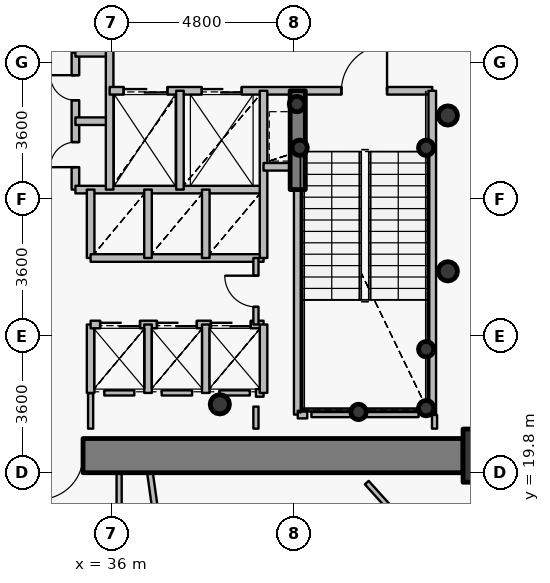
"""IFC4 building model, lengths in metres.
Left out: names, types, materials, properties, quantities, classifications, styles, units other than length and angle.
Written with IfcOpenShell. Run it as: python <this file> out.ifc"""

import sys

from ifc_helpers import new_model, si_unit, direction, frame, frame_2d, origin, origin_2d, place, context, subcontext, project, spatial, rectangle, hollow_circle, extrude, source, transform, mapped, element, fill, save


model = new_model("IFC4")
c1 = context("Model", 3, precision=1e-05, world=origin(), true_north=direction((0.0, 1.0)))
c2 = subcontext(c1, "Body", "Model", "MODEL_VIEW")
j1 = project(units=[si_unit("LENGTHUNIT", "METRE"), si_unit("PLANEANGLEUNIT", "RADIAN")], contexts=[c1])
p1 = place(None, origin())
s1 = spatial("IfcSite", under=j1, at=p1, CompositionType="ELEMENT")
p2 = place(p1, origin())
s2 = spatial("IfcBuilding", under=s1, at=p2, CompositionType="ELEMENT")
p3 = place(p2, frame((0.0, 0.0, 40.8)))
s3 = spatial("IfcBuildingStorey", under=s2, at=p3, CompositionType="ELEMENT", Elevation=40.8)
p4 = place(p3, frame((45.95, 20.25, 0.0), z_axis=(0.0, 0.0, 1.0), x_axis=(1.0, 0.0, 0.0)))
e1 = element("IfcColumn", 1, at=p4, inside=s3, PredefinedType="COLUMN", context=c2, shape_type="SweptSolid", body=[
    extrude(rectangle(XDim=1.4, YDim=1.4, at=origin_2d()), origin(), (0.0, 0.0, 1.0), 4.2),
])
p5 = place(p3, frame((38.85, 21.6, 0.0), z_axis=(0.0, 0.0, 1.0), x_axis=(1.0, 0.0, 0.0)))
e2 = element("IfcColumn", 2, at=p5, inside=s3, PredefinedType="COLUMN", context=c2, shape_type="SweptSolid", body=[
    extrude(hollow_circle(Radius=0.254, WallThickness=0.02, at=origin_2d()), origin(), (0.0, 0.0, 1.0), 4.2),
])
for number, where, z_axis, x_axis in (
    (3, (44.28, 21.5, 0.0), (0.0, 0.0, 1.0), (1.0, 0.0, 0.0)),
    (4, (44.28, 23.05, 0.0), (0.0, 0.0, 1.0), (1.0, 0.0, 0.0)),
    (5, (42.5, 21.4, 0.0), (0.0, 0.0, 1.0), (1.0, 0.0, 0.0)),
    (6, (40.95, 28.35, 0.0), (0.0, 0.0, 1.0), (1.0, 0.0, 0.0)),
    (7, (44.28, 28.35, 0.0), (0.0, 0.0, 1.0), (1.0, 0.0, 0.0)),
    (8, (40.88, 29.5, 0.0), (0.0, 0.0, 1.0), (1.0, 0.0, 0.0)),
):
    element("IfcColumn", number, at=place(p3, frame(where, z_axis=z_axis, x_axis=x_axis)), inside=s3, PredefinedType="COLUMN", context=c2, shape_type="SweptSolid", body=[
        extrude(hollow_circle(Radius=0.203, WallThickness=0.016, at=origin_2d()), origin(), (0.0, 0.0, 1.0), 4.2),
    ])
p6 = place(p3, frame((45.25, 20.25, 0.0), z_axis=(0.0, 0.0, 1.0), x_axis=(-1.0, 0.0, 0.0)))
e9 = element("IfcWall", 9, at=p6, inside=s3, PredefinedType="SHEAR", context=c2, shape_type="SweptSolid", body=[
    extrude(rectangle(XDim=18.5, YDim=0.9, at=frame_2d((9.25, 0.0))), origin(), (0.0, 0.0, 1.0), 3.4),
])
p7 = place(p6, frame((10.0, 0.0, 0.0)))
e10 = element("IfcOpeningElement", 10, at=p7, cuts=e9, PredefinedType="OPENING", context=c2, shape_type="SweptSolid", body=[
    extrude(rectangle(XDim=1.15, YDim=2.15, at=origin_2d()), frame((0.575, 0.46, 1.075), z_axis=(0.0, -1.0, 0.0), x_axis=(1.0, 0.0, 0.0)), (0.0, 0.0, 1.0), 0.92),
])
p8 = place(p3, frame((40.9, 27.25, 0.0), z_axis=(0.0, 0.0, 1.0), x_axis=(0.0, 1.0, 0.0)))
e11 = element("IfcWall", 11, at=p8, inside=s3, PredefinedType="SHEAR", context=c2, shape_type="SweptSolid", body=[
    extrude(rectangle(XDim=2.6, YDim=0.4, at=frame_2d((1.3, 0.0))), origin(), (0.0, 0.0, 1.0), 3.55),
])
for number, where, z_axis, x_axis in (
    (12, (44.85, 25.1, 0.0), (0.0, 0.0, 1.0), (1.0, 0.0, 0.0)),
    (13, (44.85, 29.2, 0.0), (0.0, 0.0, 1.0), (1.0, 0.0, 0.0)),
):
    element("IfcColumn", number, at=place(p3, frame(where, z_axis=z_axis, x_axis=x_axis)), inside=s3, PredefinedType="COLUMN", context=c2, shape_type="SweptSolid", body=[
        extrude(hollow_circle(Radius=0.254, WallThickness=0.02, at=origin_2d()), origin(), (0.0, 0.0, 1.0), 4.2),
    ])
p9 = place(p3, frame((35.05, 27.25, 0.0), z_axis=(0.0, 0.0, 1.0), x_axis=(0.0, 1.0, 0.0)))
e14 = element("IfcWall", 14, at=p9, inside=s3, PredefinedType="PARTITIONING", context=c2, shape_type="SweptSolid", body=[
    extrude(rectangle(XDim=3.6, YDim=0.2, at=frame_2d((1.8, 0.0))), origin(), (0.0, 0.0, 1.0), 3.95),
])
p10 = place(p9, frame((0.59, 0.0, 0.0)))
e15 = element("IfcOpeningElement", 15, at=p10, cuts=e14, PredefinedType="OPENING", context=c2, shape_type="SweptSolid", body=[
    extrude(rectangle(XDim=0.66, YDim=2.05, at=origin_2d()), frame((0.33, 0.11, 1.025), z_axis=(0.0, -1.0, 0.0), x_axis=(1.0, 0.0, 0.0)), (0.0, 0.0, 1.0), 0.22),
])
p11 = place(p9, frame((2.35, 0.0, 0.0)))
e16 = element("IfcOpeningElement", 16, at=p11, cuts=e14, PredefinedType="OPENING", context=c2, shape_type="SweptSolid", body=[
    extrude(rectangle(XDim=0.66, YDim=2.05, at=origin_2d()), frame((0.33, 0.11, 1.025), z_axis=(0.0, -1.0, 0.0), x_axis=(1.0, 0.0, 0.0)), (0.0, 0.0, 1.0), 0.22),
])
p12 = place(p3, frame((35.05, 27.25, 0.0), z_axis=(0.0, 0.0, 1.0), x_axis=(1.0, 0.0, 0.0)))
e17 = element("IfcWall", 17, at=p12, inside=s3, PredefinedType="PARTITIONING", context=c2, shape_type="SweptSolid", body=[
    extrude(rectangle(XDim=4.95, YDim=0.2, at=frame_2d((2.475, 0.0))), origin(), (0.0, 0.0, 1.0), 3.535),
])
for number, where, z_axis, x_axis in (
    (18, (35.05, 29.05, 0.0), (0.0, 0.0, 1.0), (1.0, 0.0, 0.0)),
    (19, (35.05, 30.85, 0.0), (0.0, 0.0, 1.0), (1.0, 0.0, 0.0)),
):
    element("IfcWall", number, at=place(p3, frame(where, z_axis=z_axis, x_axis=x_axis)), inside=s3, PredefinedType="PARTITIONING", context=c2, shape_type="SweptSolid", body=[
        extrude(rectangle(XDim=0.9, YDim=0.2, at=frame_2d((0.45, 0.0))), origin(), (0.0, 0.0, 1.0), 3.95),
    ])
p13 = place(p3, frame((35.45, 21.9, 0.0), z_axis=(0.0, 0.0, 1.0), x_axis=(0.0, 1.0, 0.0)))
e20 = element("IfcWall", 20, at=p13, inside=s3, PredefinedType="PARTITIONING", context=c2, shape_type="SweptSolid", body=[
    extrude(rectangle(XDim=1.8, YDim=0.2, at=frame_2d((0.9, 0.0))), origin(), (0.0, 0.0, 1.0), 3.95),
])
p14 = place(p3, frame((35.45, 23.7, 0.0), z_axis=(0.0, 0.0, 1.0), x_axis=(1.0, 0.0, 0.0)))
e21 = element("IfcWall", 21, at=p14, inside=s3, PredefinedType="PARTITIONING", context=c2, shape_type="SweptSolid", body=[
    extrude(rectangle(XDim=4.55, YDim=0.2, at=frame_2d((2.275, 0.0))), origin(), (0.0, 0.0, 1.0), 3.535),
])
p15 = place(p14, frame((0.25, 0.0, 0.0)))
e22 = element("IfcOpeningElement", 22, at=p15, cuts=e21, PredefinedType="OPENING", context=c2, shape_type="SweptSolid", body=[
    extrude(rectangle(XDim=1.05, YDim=2.15, at=origin_2d()), frame((0.525, 0.11, 1.075), z_axis=(0.0, -1.0, 0.0), x_axis=(1.0, 0.0, 0.0)), (0.0, 0.0, 1.0), 0.22),
])
p16 = place(p14, frame((1.745, 0.0, 0.0)))
e23 = element("IfcOpeningElement", 23, at=p16, cuts=e21, PredefinedType="OPENING", context=c2, shape_type="SweptSolid", body=[
    extrude(rectangle(XDim=1.05, YDim=2.15, at=origin_2d()), frame((0.525, 0.11, 1.075), z_axis=(0.0, -1.0, 0.0), x_axis=(1.0, 0.0, 0.0)), (0.0, 0.0, 1.0), 0.22),
])
p17 = place(p14, frame((3.165, 0.0, 0.0)))
e24 = element("IfcOpeningElement", 24, at=p17, cuts=e21, PredefinedType="OPENING", context=c2, shape_type="SweptSolid", body=[
    extrude(rectangle(XDim=1.05, YDim=2.15, at=origin_2d()), frame((0.525, 0.11, 1.075), z_axis=(0.0, -1.0, 0.0), x_axis=(1.0, 0.0, 0.0)), (0.0, 0.0, 1.0), 0.22),
])
p18 = place(p3, frame((35.45, 25.45, 0.0), z_axis=(0.0, 0.0, 1.0), x_axis=(0.0, 1.0, 0.0)))
e25 = element("IfcWall", 25, at=p18, inside=s3, PredefinedType="PARTITIONING", context=c2, shape_type="SweptSolid", body=[
    extrude(rectangle(XDim=1.8, YDim=0.2, at=frame_2d((0.9, 0.0))), origin(), (0.0, 0.0, 1.0), 3.95),
])
p19 = place(p3, frame((35.45, 25.45, 0.0), z_axis=(0.0, 0.0, 1.0), x_axis=(1.0, 0.0, 0.0)))
e26 = element("IfcWall", 26, at=p19, inside=s3, PredefinedType="PARTITIONING", context=c2, shape_type="SweptSolid", body=[
    extrude(rectangle(XDim=4.55, YDim=0.2, at=frame_2d((2.275, 0.0))), origin(), (0.0, 0.0, 1.0), 3.535),
])
p20 = place(p3, frame((35.95, 27.25, 0.0), z_axis=(0.0, 0.0, 1.0), x_axis=(0.0, 1.0, 0.0)))
e27 = element("IfcWall", 27, at=p20, inside=s3, PredefinedType="PARTITIONING", context=c2, shape_type="SweptSolid", body=[
    extrude(rectangle(XDim=3.8, YDim=0.2, at=frame_2d((1.9, 0.0))), origin(), (0.0, 0.0, 1.0), 3.95),
])
p21 = place(p3, frame((35.95, 29.85, 0.0), z_axis=(0.0, 0.0, 1.0), x_axis=(1.0, 0.0, 0.0)))
e28 = element("IfcWall", 28, at=p21, inside=s3, PredefinedType="PARTITIONING", context=c2, shape_type="SweptSolid", body=[
    extrude(rectangle(XDim=8.49, YDim=0.2, at=frame_2d((4.245, 0.0))), origin(), (0.0, 0.0, 1.0), 3.535),
])
p22 = place(p21, frame((6.1, 0.0, 0.0)))
e29 = element("IfcOpeningElement", 29, at=p22, cuts=e28, PredefinedType="OPENING", context=c2, shape_type="SweptSolid", body=[
    extrude(rectangle(XDim=1.2, YDim=2.15, at=origin_2d()), frame((0.6, 0.11, 1.075), z_axis=(0.0, -1.0, 0.0), x_axis=(1.0, 0.0, 0.0)), (0.0, 0.0, 1.0), 0.22),
])
p23 = place(p21, frame((0.37, 0.0, 0.0)))
e30 = element("IfcOpeningElement", 30, at=p23, cuts=e28, PredefinedType="OPENING", context=c2, shape_type="SweptSolid", body=[
    extrude(rectangle(XDim=1.15, YDim=2.15, at=origin_2d()), frame((0.575, 0.11, 1.075), z_axis=(0.0, -1.0, 0.0), x_axis=(1.0, 0.0, 0.0)), (0.0, 0.0, 1.0), 0.22),
])
p24 = place(p21, frame((2.425, 0.0, 0.0)))
e31 = element("IfcOpeningElement", 31, at=p24, cuts=e28, PredefinedType="OPENING", context=c2, shape_type="SweptSolid", body=[
    extrude(rectangle(XDim=1.05, YDim=2.15, at=origin_2d()), frame((0.525, 0.11, 1.075), z_axis=(0.0, -1.0, 0.0), x_axis=(1.0, 0.0, 0.0)), (0.0, 0.0, 1.0), 0.22),
])
p25 = place(p3, frame((36.2, 17.9, 0.0), z_axis=(0.0, 0.0, 1.0), x_axis=(0.0, 1.0, 0.0)))
e32 = element("IfcWall", 32, at=p25, inside=s3, PredefinedType="PARTITIONING", context=c2, shape_type="SweptSolid", body=[
    extrude(rectangle(XDim=1.9, YDim=0.135, at=frame_2d((0.95, 0.0))), origin(), (0.0, 0.0, 1.0), 3.285),
])
for number, where, z_axis, x_axis in (
    (33, (36.96, 21.9, 0.0), (0.0, 0.0, 1.0), (0.0, 1.0, 0.0)),
    (34, (36.96, 25.45, 0.0), (0.0, 0.0, 1.0), (0.0, 1.0, 0.0)),
):
    element("IfcWall", number, at=place(p3, frame(where, z_axis=z_axis, x_axis=x_axis)), inside=s3, PredefinedType="PARTITIONING", context=c2, shape_type="SweptSolid", body=[
        extrude(rectangle(XDim=1.8, YDim=0.2, at=frame_2d((0.9, 0.0))), origin(), (0.0, 0.0, 1.0), 3.95),
    ])
p26 = place(p3, frame((37.012, 19.8, 0.0), z_axis=(0.0, 0.0, 1.0), x_axis=(0.139168038406, -0.990268780224, 0.0)))
e35 = element("IfcWall", 35, at=p26, inside=s3, PredefinedType="PARTITIONING", context=c2, shape_type="SweptSolid", body=[
    extrude(rectangle(XDim=17.067, YDim=0.15, at=frame_2d((8.534, 0.0))), origin(), (0.0, 0.0, 1.0), 3.335),
])
p27 = place(p3, frame((37.8, 27.25, 0.0), z_axis=(0.0, 0.0, 1.0), x_axis=(0.0, 1.0, 0.0)))
e36 = element("IfcWall", 36, at=p27, inside=s3, PredefinedType="PARTITIONING", context=c2, shape_type="SweptSolid", body=[
    extrude(rectangle(XDim=2.6, YDim=0.2, at=frame_2d((1.3, 0.0))), origin(), (0.0, 0.0, 1.0), 3.95),
])
for number, where, z_axis, x_axis in (
    (37, (38.48, 21.9, 0.0), (0.0, 0.0, 1.0), (0.0, 1.0, 0.0)),
    (38, (38.48, 25.45, 0.0), (0.0, 0.0, 1.0), (0.0, 1.0, 0.0)),
):
    element("IfcWall", number, at=place(p3, frame(where, z_axis=z_axis, x_axis=x_axis)), inside=s3, PredefinedType="PARTITIONING", context=c2, shape_type="SweptSolid", body=[
        extrude(rectangle(XDim=1.8, YDim=0.2, at=frame_2d((0.9, 0.0))), origin(), (0.0, 0.0, 1.0), 3.95),
    ])
p28 = place(p3, frame((39.8, 21.9, 0.0), z_axis=(0.0, 0.0, 1.0), x_axis=(1.0, 0.0, 0.0)))
e39 = element("IfcWall", 39, at=p28, inside=s3, PredefinedType="PARTITIONING", context=c2, shape_type="SweptSolid", body=[
    extrude(rectangle(XDim=0.2, YDim=0.2, at=frame_2d((0.1, 0.0))), origin(), (0.0, 0.0, 1.0), 3.95),
])
p29 = place(p3, frame((39.8, 23.7, 0.0), z_axis=(0.0, 0.0, 1.0), x_axis=(0.0, 1.0, 0.0)))
e40 = element("IfcWall", 40, at=p29, inside=s3, PredefinedType="PARTITIONING", context=c2, shape_type="SweptSolid", body=[
    extrude(rectangle(XDim=1.75, YDim=0.135, at=frame_2d((0.875, 0.0))), origin(), (0.0, 0.0, 1.0), 3.95),
])
p30 = place(p29, frame((0.465, 0.0, 0.0)))
e41 = element("IfcOpeningElement", 41, at=p30, cuts=e40, PredefinedType="OPENING", context=c2, shape_type="SweptSolid", body=[
    extrude(rectangle(XDim=0.82, YDim=2.1, at=origin_2d()), frame((0.41, 0.078, 1.05), z_axis=(0.0, -1.0, 0.0), x_axis=(1.0, 0.0, 0.0)), (0.0, 0.0, 1.0), 0.155),
])
p31 = place(p3, frame((40.0, 21.9, 0.0), z_axis=(0.0, 0.0, 1.0), x_axis=(0.0, 1.0, 0.0)))
e42 = element("IfcWall", 42, at=p31, inside=s3, PredefinedType="PARTITIONING", context=c2, shape_type="SweptSolid", body=[
    extrude(rectangle(XDim=1.8, YDim=0.2, at=frame_2d((0.9, 0.0))), origin(), (0.0, 0.0, 1.0), 3.95),
])
p32 = place(p3, frame((40.0, 25.45, 0.0), z_axis=(0.0, 0.0, 1.0), x_axis=(0.0, 1.0, 0.0)))
e43 = element("IfcWall", 43, at=p32, inside=s3, PredefinedType="PARTITIONING", context=c2, shape_type="SweptSolid", body=[
    extrude(rectangle(XDim=4.4, YDim=0.2, at=frame_2d((2.2, 0.0))), origin(), (0.0, 0.0, 1.0), 3.95),
])
p33 = place(p3, frame((40.0, 27.85, 0.0), z_axis=(0.0, 0.0, 1.0), x_axis=(1.0, 0.0, 0.0)))
e44 = element("IfcWall", 44, at=p33, inside=s3, PredefinedType="PARTITIONING", context=c2, shape_type="SweptSolid", body=[
    extrude(rectangle(XDim=0.9, YDim=0.2, at=frame_2d((0.45, 0.0))), origin(), (0.0, 0.0, 1.0), 3.95),
])
p34 = place(p3, frame((40.9, 21.33, 0.0), z_axis=(0.0, 0.0, 1.0), x_axis=(0.0, 1.0, 0.0)))
e45 = element("IfcWall", 45, at=p34, inside=s3, PredefinedType="PARTITIONING", context=c2, shape_type="SweptSolid", body=[
    extrude(rectangle(XDim=5.91, YDim=0.2, at=frame_2d((2.955, 0.0))), origin(), (0.0, 0.0, 1.0), 3.485),
])
p35 = place(p3, frame((40.9, 21.33, 0.0), z_axis=(0.0, 0.0, 1.0), x_axis=(1.0, 0.0, 0.0)))
e46 = element("IfcWall", 46, at=p35, inside=s3, PredefinedType="PARTITIONING", context=c2, shape_type="SweptSolid", body=[
    extrude(rectangle(XDim=0.25, YDim=0.2, at=frame_2d((0.125, 0.0))), origin(), (0.0, 0.0, 1.0), 3.485),
])
p36 = place(p3, frame((44.44, 21.33, 0.0), z_axis=(0.0, 0.0, 1.0), x_axis=(0.0, 1.0, 0.0)))
e47 = element("IfcWall", 47, at=p36, inside=s3, PredefinedType="PARTITIONING", context=c2, shape_type="SweptSolid", body=[
    extrude(rectangle(XDim=8.52, YDim=0.2, at=frame_2d((4.26, 0.0))), origin(), (0.0, 0.0, 1.0), 3.95),
])
p37 = place(p3, frame((44.08, 21.33, 0.0), z_axis=(0.0, 0.0, 1.0), x_axis=(-1.0, 0.0, 0.0)))
e48 = element("IfcWall", 48, at=p37, inside=s3, PredefinedType="PARTITIONING", context=c2, shape_type="SweptSolid", body=[
    extrude(rectangle(XDim=2.82, YDim=0.135, at=frame_2d((1.41, 0.0))), origin(), (0.0, 0.0, 1.0), 3.485),
])
p38 = place(p3, frame((36.6, 21.9, 0.0), z_axis=(0.0, 0.0, 1.0), x_axis=(-1.0, 0.0, 0.0)))
e49 = element("IfcWall", 49, at=p38, inside=s3, PredefinedType="PARTITIONING", context=c2, shape_type="SweptSolid", body=[
    extrude(rectangle(XDim=0.79, YDim=0.135, at=frame_2d((0.395, 0.0))), origin(), (0.0, 0.0, 1.0), 3.95),
])
p39 = place(p3, frame((38.12, 21.9, 0.0), z_axis=(0.0, 0.0, 1.0), x_axis=(-1.0, 0.0, 0.0)))
e50 = element("IfcWall", 50, at=p39, inside=s3, PredefinedType="PARTITIONING", context=c2, shape_type="SweptSolid", body=[
    extrude(rectangle(XDim=0.8, YDim=0.135, at=frame_2d((0.4, 0.0))), origin(), (0.0, 0.0, 1.0), 3.95),
])
p40 = place(p3, frame((39.64, 21.9, 0.0), z_axis=(0.0, 0.0, 1.0), x_axis=(-1.0, 0.0, 0.0)))
e51 = element("IfcWall", 51, at=p40, inside=s3, PredefinedType="PARTITIONING", context=c2, shape_type="SweptSolid", body=[
    extrude(rectangle(XDim=0.8, YDim=0.135, at=frame_2d((0.4, 0.0))), origin(), (0.0, 0.0, 1.0), 3.535),
])
p41 = place(p3, frame((39.8, 20.96, 0.0), z_axis=(0.0, 0.0, 1.0), x_axis=(0.0, 1.0, 0.0)))
e52 = element("IfcWall", 52, at=p41, inside=s3, PredefinedType="PARTITIONING", context=c2, shape_type="SweptSolid", body=[
    extrude(rectangle(XDim=0.58, YDim=0.135, at=frame_2d((0.29, 0.0))), origin(), (0.0, 0.0, 1.0), 3.485),
])
p42 = place(p3, frame((44.5, 20.96, 0.0), z_axis=(0.0, 0.0, 1.0), x_axis=(0.0, 1.0, 0.0)))
e53 = element("IfcWall", 53, at=p42, inside=s3, PredefinedType="PARTITIONING", context=c2, shape_type="SweptSolid", body=[
    extrude(rectangle(XDim=0.36, YDim=0.135, at=frame_2d((0.18, 0.0))), origin(), (0.0, 0.0, 1.0), 3.95),
])
p43 = place(p3, frame((35.45, 21.89, 0.0), z_axis=(0.0, 0.0, 1.0), x_axis=(0.0, -1.0, 0.0)))
e54 = element("IfcWall", 54, at=p43, inside=s3, PredefinedType="PARTITIONING", context=c2, shape_type="SweptSolid", body=[
    extrude(rectangle(XDim=0.93, YDim=0.135, at=frame_2d((0.465, 0.0))), origin(), (0.0, 0.0, 1.0), 3.535),
])
p44 = place(p3, frame((42.717, 19.54, 0.0), z_axis=(0.0, 0.0, 1.0), x_axis=(0.669122827361, -0.743151829645, 0.0)))
e55 = element("IfcWall", 55, at=p44, inside=s3, PredefinedType="PARTITIONING", context=c2, shape_type="SweptSolid", body=[
    extrude(rectangle(XDim=4.521, YDim=0.135, at=frame_2d((2.261, 0.0))), origin(), (0.0, 0.0, 1.0), 3.95),
])
m1 = source(origin(), c2, "Body", "SweptSolid", [
    extrude(rectangle(XDim=1.15, YDim=2.15, at=origin_2d()), frame((0.575, 0.025, 1.075), z_axis=(0.0, -1.0, 0.0), x_axis=(1.0, 0.0, 0.0)), (0.0, 0.0, 1.0), 0.05),
])
p45 = place(p7, origin())
e56 = element("IfcDoor", 56, at=p45, inside=s3, OperationType="SINGLE_SWING_RIGHT", PredefinedType="DOOR", context=c2, shape_type="MappedRepresentation", body=[
    mapped(m1, transform((0.0, 0.0, 0.0), x_axis=(1.0, 0.0, 0.0), y_axis=(0.0, 1.0, 0.0), z_axis=(0.0, 0.0, 1.0), scale=1.0)),
])
fill(e10, e56)
m2 = source(origin(), c2, "Body", "SweptSolid", [
    extrude(rectangle(XDim=1.2, YDim=2.15, at=origin_2d()), frame((0.6, 0.025, 1.075), z_axis=(0.0, -1.0, 0.0), x_axis=(1.0, 0.0, 0.0)), (0.0, 0.0, 1.0), 0.05),
])
p46 = place(p22, origin())
e57 = element("IfcDoor", 57, at=p46, inside=s3, OperationType="SINGLE_SWING_RIGHT", PredefinedType="DOOR", context=c2, shape_type="MappedRepresentation", body=[
    mapped(m2, transform((0.0, 0.0, 0.0), x_axis=(1.0, 0.0, 0.0), y_axis=(0.0, 1.0, 0.0), z_axis=(0.0, 0.0, 1.0), scale=1.0)),
])
fill(e29, e57)
m3 = source(origin(), c2, "Body", "SweptSolid", [
    extrude(rectangle(XDim=1.15, YDim=2.15, at=origin_2d()), frame((0.575, 0.025, 1.075), z_axis=(0.0, -1.0, 0.0), x_axis=(1.0, 0.0, 0.0)), (0.0, 0.0, 1.0), 0.05),
])
p47 = place(p23, origin())
e58 = element("IfcDoor", 58, at=p47, inside=s3, OperationType="DOUBLE_DOOR_SLIDING", PredefinedType="USERDEFINED", context=c2, shape_type="MappedRepresentation", body=[
    mapped(m3, transform((0.0, 0.0, 0.0), x_axis=(1.0, 0.0, 0.0), y_axis=(0.0, 1.0, 0.0), z_axis=(0.0, 0.0, 1.0), scale=1.0)),
])
fill(e30, e58)
m4 = source(origin(), c2, "Body", "SweptSolid", [
    extrude(rectangle(XDim=1.05, YDim=2.15, at=origin_2d()), frame((0.525, 0.025, 1.075), z_axis=(0.0, -1.0, 0.0), x_axis=(1.0, 0.0, 0.0)), (0.0, 0.0, 1.0), 0.05),
])
p48 = place(p24, origin())
e59 = element("IfcDoor", 59, at=p48, inside=s3, OperationType="DOUBLE_DOOR_SLIDING", PredefinedType="USERDEFINED", context=c2, shape_type="MappedRepresentation", body=[
    mapped(m4, transform((0.0, 0.0, 0.0), x_axis=(1.0, 0.0, 0.0), y_axis=(0.0, 1.0, 0.0), z_axis=(0.0, 0.0, 1.0), scale=1.0)),
])
fill(e31, e59)
p49 = place(p15, origin())
e60 = element("IfcDoor", 60, at=p49, inside=s3, OperationType="DOUBLE_DOOR_SLIDING", PredefinedType="USERDEFINED", context=c2, shape_type="MappedRepresentation", body=[
    mapped(m4, transform((0.0, 0.0, 0.0), x_axis=(1.0, 0.0, 0.0), y_axis=(0.0, 1.0, 0.0), z_axis=(0.0, 0.0, 1.0), scale=1.0)),
])
fill(e22, e60)
p50 = place(p16, origin())
e61 = element("IfcDoor", 61, at=p50, inside=s3, OperationType="DOUBLE_DOOR_SLIDING", PredefinedType="USERDEFINED", context=c2, shape_type="MappedRepresentation", body=[
    mapped(m4, transform((0.0, 0.0, 0.0), x_axis=(1.0, 0.0, 0.0), y_axis=(0.0, 1.0, 0.0), z_axis=(0.0, 0.0, 1.0), scale=1.0)),
])
fill(e23, e61)
p51 = place(p17, origin())
e62 = element("IfcDoor", 62, at=p51, inside=s3, OperationType="DOUBLE_DOOR_SLIDING", PredefinedType="USERDEFINED", context=c2, shape_type="MappedRepresentation", body=[
    mapped(m4, transform((0.0, 0.0, 0.0), x_axis=(1.0, 0.0, 0.0), y_axis=(0.0, 1.0, 0.0), z_axis=(0.0, 0.0, 1.0), scale=1.0)),
])
fill(e24, e62)
m5 = source(origin(), c2, "Body", "SweptSolid", [
    extrude(rectangle(XDim=0.66, YDim=2.05, at=origin_2d()), frame((0.33, 0.025, 1.025), z_axis=(0.0, -1.0, 0.0), x_axis=(1.0, 0.0, 0.0)), (0.0, 0.0, 1.0), 0.05),
])
p52 = place(p10, origin())
e63 = element("IfcDoor", 63, at=p52, inside=s3, OperationType="SINGLE_SWING_LEFT", PredefinedType="USERDEFINED", context=c2, shape_type="MappedRepresentation", body=[
    mapped(m5, transform((0.0, 0.0, 0.0), x_axis=(1.0, 0.0, 0.0), y_axis=(0.0, 1.0, 0.0), z_axis=(0.0, 0.0, 1.0), scale=1.0)),
])
fill(e15, e63)
p53 = place(p11, origin())
e64 = element("IfcDoor", 64, at=p53, inside=s3, OperationType="SINGLE_SWING_RIGHT", PredefinedType="USERDEFINED", context=c2, shape_type="MappedRepresentation", body=[
    mapped(m5, transform((0.0, 0.0, 0.0), x_axis=(1.0, 0.0, 0.0), y_axis=(0.0, 1.0, 0.0), z_axis=(0.0, 0.0, 1.0), scale=1.0)),
])
fill(e16, e64)
m6 = source(origin(), c2, "Body", "SweptSolid", [
    extrude(rectangle(XDim=0.82, YDim=2.1, at=origin_2d()), frame((0.41, 0.025, 1.05), z_axis=(0.0, -1.0, 0.0), x_axis=(1.0, 0.0, 0.0)), (0.0, 0.0, 1.0), 0.05),
])
p54 = place(p30, origin())
e65 = element("IfcDoor", 65, at=p54, inside=s3, OperationType="SINGLE_SWING_RIGHT", PredefinedType="DOOR", context=c2, shape_type="MappedRepresentation", body=[
    mapped(m6, transform((0.0, 0.0, 0.0), x_axis=(1.0, 0.0, 0.0), y_axis=(0.0, 1.0, 0.0), z_axis=(0.0, 0.0, 1.0), scale=1.0)),
])
fill(e41, e65)
save(model, sys.argv[1])
